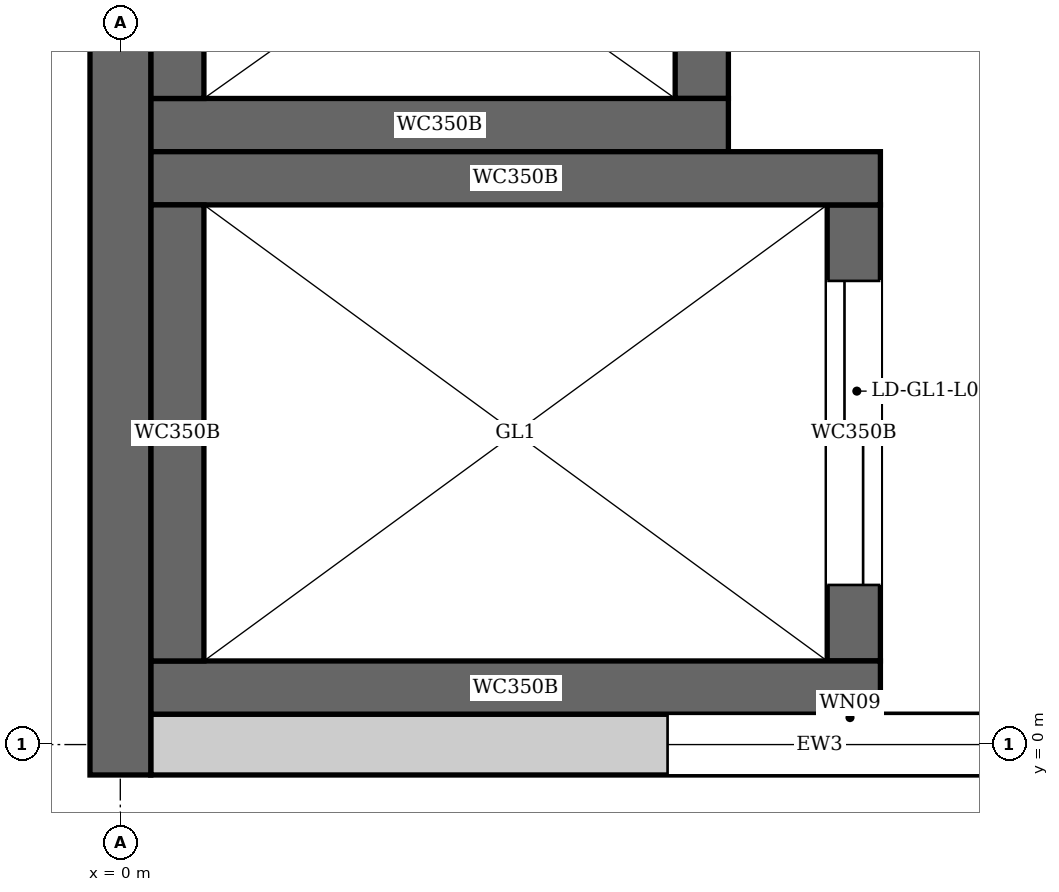
"""IFC4 building model, lengths in metres.
Left out: names, types, materials, properties, quantities, classifications, styles, units other than length and angle.
Written with IfcOpenShell. Run it as: python <this file> out.ifc"""

import sys

from ifc_helpers import new_model, si_unit, direction, frame, frame_2d, origin, place, context, subcontext, project, spatial, rectangle, extrude, element, fill, save


model = new_model("IFC4")
c1 = context("Model", 3, precision=1e-05, world=origin(), true_north=direction((0.0, 1.0)))
c2 = subcontext(c1, "Body", "Model", "MODEL_VIEW")
j1 = project(units=[si_unit("LENGTHUNIT", "METRE"), si_unit("PLANEANGLEUNIT", "RADIAN")], contexts=[c1])
p1 = place(None, origin())
s1 = spatial("IfcSite", under=j1, at=p1, CompositionType="ELEMENT")
p2 = place(p1, origin())
s2 = spatial("IfcBuilding", under=s1, at=p2, CompositionType="ELEMENT")
p3 = place(p2, frame((0.0, 0.0, 14.2)))
s3 = spatial("IfcBuildingStorey", under=s2, at=p3, CompositionType="ELEMENT", Elevation=14.2)
p4 = place(p3, frame((0.0, -0.2, 0.0), z_axis=(0.0, 0.0, 1.0), x_axis=(0.0, 1.0, 0.0)))
e1 = element("IfcWall", 1, at=p4, inside=s3, PredefinedType="SHEAR", context=c2, shape_type="SweptSolid", body=[
    extrude(rectangle(XDim=46.88, YDim=0.4, at=frame_2d((23.44, 0.0))), origin(), (0.0, 0.0, 1.0), 7.5),
])
for number, where, z_axis, x_axis in (
    (2, (0.2, 0.375, 0.0), (0.0, 0.0, 1.0), (1.0, 0.0, 0.0)),
    (3, (0.2, 3.725, 0.0), (0.0, 0.0, 1.0), (1.0, 0.0, 0.0)),
):
    element("IfcWall", number, at=place(p3, frame(where, z_axis=z_axis, x_axis=x_axis)), inside=s3, PredefinedType="SHEAR", context=c2, shape_type="SweptSolid", body=[
        extrude(rectangle(XDim=4.8, YDim=0.35, at=frame_2d((2.4, 0.0))), origin(), (0.0, 0.0, 1.0), 7.5),
    ])
p5 = place(p3, frame((0.375, 0.55, 0.0), z_axis=(0.0, 0.0, 1.0), x_axis=(0.0, 1.0, 0.0)))
e4 = element("IfcWall", 4, at=p5, inside=s3, PredefinedType="SHEAR", context=c2, shape_type="SweptSolid", body=[
    extrude(rectangle(XDim=3.0, YDim=0.35, at=frame_2d((1.5, 0.0))), origin(), (0.0, 0.0, 1.0), 7.5),
])
p6 = place(p3, frame((4.825, 0.55, 0.0), z_axis=(0.0, 0.0, 1.0), x_axis=(0.0, 1.0, 0.0)))
e5 = element("IfcWall", 5, at=p6, inside=s3, PredefinedType="SHEAR", context=c2, shape_type="SweptSolid", body=[
    extrude(rectangle(XDim=3.0, YDim=0.35, at=frame_2d((1.5, 0.0))), origin(), (0.0, 0.0, 1.0), 7.5),
])
p7 = place(p6, frame((0.5, 0.0, 0.0)))
e6 = element("IfcOpeningElement", 6, at=p7, cuts=e5, PredefinedType="OPENING", context=c2, shape_type="SweptSolid", body=[
    extrude(rectangle(XDim=2.0, YDim=2.4, at=frame_2d((1.0, 1.2))), frame((0.0, 0.185, 0.0), z_axis=(0.0, -1.0, 0.0), x_axis=(1.0, 0.0, 0.0)), (0.0, 0.0, 1.0), 0.37),
])
p8 = place(p3, frame((0.2, 4.075, 0.0), z_axis=(0.0, 0.0, 1.0), x_axis=(1.0, 0.0, 0.0)))
e7 = element("IfcWall", 7, at=p8, inside=s3, PredefinedType="SHEAR", context=c2, shape_type="SweptSolid", body=[
    extrude(rectangle(XDim=3.8, YDim=0.35, at=frame_2d((1.9, 0.0))), origin(), (0.0, 0.0, 1.0), 7.5),
])
p9 = place(p3, frame((0.375, 4.25, 0.0), z_axis=(0.0, 0.0, 1.0), x_axis=(0.0, 1.0, 0.0)))
e8 = element("IfcWall", 8, at=p9, inside=s3, PredefinedType="SHEAR", context=c2, shape_type="SweptSolid", body=[
    extrude(rectangle(XDim=2.2, YDim=0.35, at=frame_2d((1.1, 0.0))), origin(), (0.0, 0.0, 1.0), 7.5),
])
p10 = place(p3, frame((3.825, 4.25, 0.0), z_axis=(0.0, 0.0, 1.0), x_axis=(0.0, 1.0, 0.0)))
e9 = element("IfcWall", 9, at=p10, inside=s3, PredefinedType="SHEAR", context=c2, shape_type="SweptSolid", body=[
    extrude(rectangle(XDim=2.2, YDim=0.35, at=frame_2d((1.1, 0.0))), origin(), (0.0, 0.0, 1.0), 7.5),
])
p11 = place(p10, frame((0.55, 0.0, 0.0)))
e10 = element("IfcOpeningElement", 10, at=p11, cuts=e9, PredefinedType="OPENING", context=c2, shape_type="SweptSolid", body=[
    extrude(rectangle(XDim=1.1, YDim=2.1, at=frame_2d((0.55, 1.05))), frame((0.0, 0.185, 0.0), z_axis=(0.0, -1.0, 0.0), x_axis=(1.0, 0.0, 0.0)), (0.0, 0.0, 1.0), 0.37),
])
p12 = place(p3, frame((0.2, 0.0, 0.0), z_axis=(0.0, 0.0, 1.0), x_axis=(1.0, 0.0, 0.0)))
e11 = element("IfcWall", 11, at=p12, inside=s3, PredefinedType="ELEMENTEDWALL", context=c2, shape_type="SweptSolid", body=[
    extrude(rectangle(XDim=8.8, YDim=0.4, at=frame_2d((4.4, 0.0))), origin(), (0.0, 0.0, 1.0), 7.15),
])
p13 = place(p12, frame((3.4, 0.0, 1.0)))
e12 = element("IfcOpeningElement", 12, at=p13, cuts=e11, PredefinedType="OPENING", context=c2, shape_type="SweptSolid", body=[
    extrude(rectangle(XDim=2.4, YDim=2.2, at=frame_2d((1.2, 1.1))), frame((0.0, 0.21, 0.0), z_axis=(0.0, -1.0, 0.0), x_axis=(1.0, 0.0, 0.0)), (0.0, 0.0, 1.0), 0.42),
])
p14 = place(p13, origin())
e13 = element("IfcWindow", 13, at=p14, inside=s3, PartitioningType="SINGLE_PANEL", PredefinedType="WINDOW", context=c2, shape_type="SweptSolid", body=[
    extrude(rectangle(XDim=2.4, YDim=2.2, at=frame_2d((1.2, 1.1))), frame((0.0, 0.03, 0.0), z_axis=(0.0, -1.0, 0.0), x_axis=(1.0, 0.0, 0.0)), (0.0, 0.0, 1.0), 0.06),
])
fill(e12, e13)
p15 = place(p7, origin())
e14 = element("IfcDoor", 14, at=p15, inside=s3, OperationType="DOUBLE_DOOR_SLIDING", PredefinedType="DOOR", context=c2, shape_type="SweptSolid", body=[
    extrude(rectangle(XDim=2.0, YDim=2.4, at=frame_2d((1.0, 1.2))), frame((0.0, 0.025, 0.0), z_axis=(0.0, -1.0, 0.0), x_axis=(1.0, 0.0, 0.0)), (0.0, 0.0, 1.0), 0.05),
])
fill(e6, e14)
save(model, sys.argv[1])
